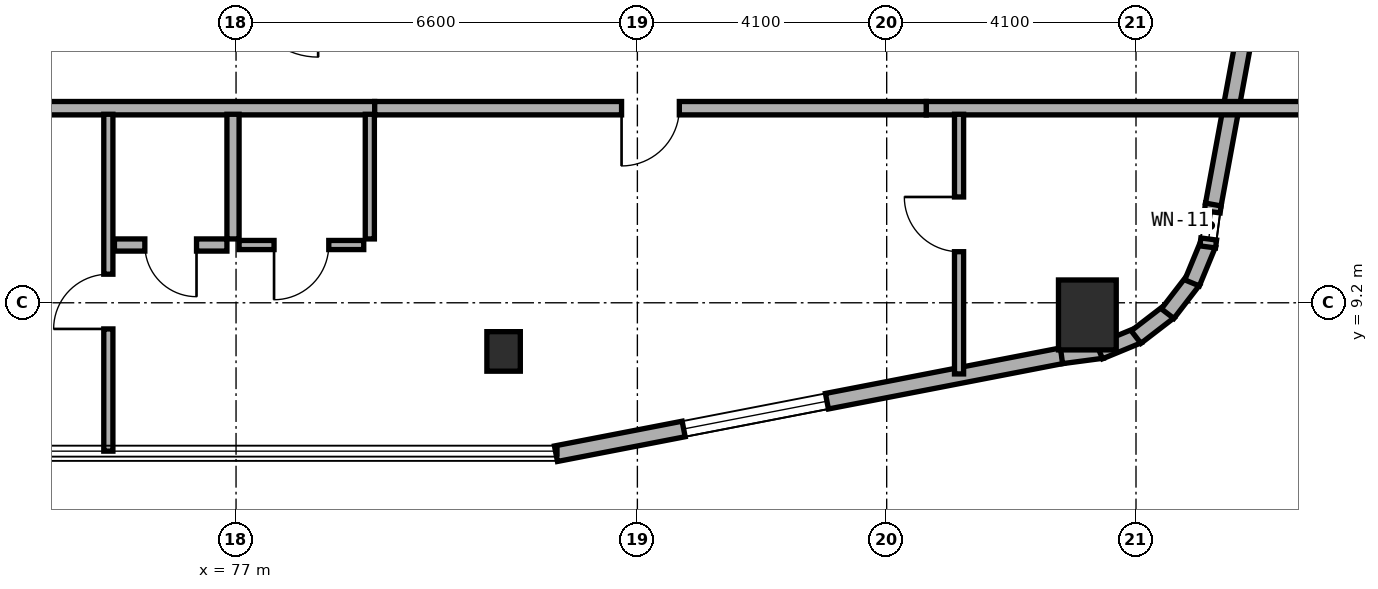
"""IFC4 building model, lengths in metres.
Left out: names, types, materials, properties, quantities, classifications, styles, units other than length and angle.
Written with IfcOpenShell. Run it as: python <this file> out.ifc"""

import sys

from ifc_helpers import new_model, si_unit, direction, frame, frame_2d, origin, origin_2d, place, context, subcontext, project, spatial, rectangle, extrude, element, fill, save


model = new_model("IFC4")
c1 = context("Model", 3, precision=1e-05, world=origin(), true_north=direction((0.0, 1.0)))
c2 = subcontext(c1, "Body", "Model", "MODEL_VIEW")
j1 = project(units=[si_unit("LENGTHUNIT", "METRE"), si_unit("PLANEANGLEUNIT", "RADIAN")], contexts=[c1])
p1 = place(None, origin())
s1 = spatial("IfcSite", under=j1, at=p1, CompositionType="ELEMENT")
p2 = place(p1, origin())
s2 = spatial("IfcBuilding", under=s1, at=p2, CompositionType="ELEMENT")
p3 = place(p2, frame((0.0, 0.0, 116.0)))
s3 = spatial("IfcBuildingStorey", under=s2, at=p3, CompositionType="ELEMENT", Elevation=116.0)
p4 = place(p3, frame((81.4, 8.4, 0.0), z_axis=(0.0, 0.0, 1.0), x_axis=(1.0, 0.0, 0.0)))
e1 = element("IfcColumn", 1, at=p4, inside=s3, PredefinedType="COLUMN", context=c2, shape_type="SweptSolid", body=[
    extrude(rectangle(XDim=0.55, YDim=0.65, at=origin_2d()), origin(), (0.0, 0.0, 1.0), 3.5),
])
p5 = place(p3, frame((91.0, 9.0, 0.0), z_axis=(0.0, 0.0, 1.0), x_axis=(1.0, 0.0, 0.0)))
e2 = element("IfcColumn", 2, at=p5, inside=s3, PredefinedType="COLUMN", context=c2, shape_type="SweptSolid", body=[
    extrude(rectangle(XDim=0.95, YDim=1.15, at=origin_2d()), origin(), (0.0, 0.0, 1.0), 3.5),
])
p6 = place(p3, frame((82.261, 6.718, 0.0), z_axis=(0.0, 0.0, 1.0), x_axis=(0.981750199588, 0.190175039396, 0.0)))
e3 = element("IfcWall", 3, at=p6, inside=s3, PredefinedType="STANDARD", context=c2, shape_type="SweptSolid", body=[
    extrude(rectangle(XDim=8.477, YDim=0.26, at=frame_2d((4.238, 0.0))), origin(), (0.0, 0.0, 1.0), 3.18),
])
p7 = place(p6, frame((2.139, 0.0, 0.8)))
e4 = element("IfcOpeningElement", 4, at=p7, cuts=e3, PredefinedType="OPENING", context=c2, shape_type="SweptSolid", body=[
    extrude(rectangle(XDim=2.4, YDim=1.6, at=frame_2d((1.2, 0.8))), frame((0.0, 0.14, 0.0), z_axis=(0.0, -1.0, 0.0), x_axis=(1.0, 0.0, 0.0)), (0.0, 0.0, 1.0), 0.28),
])
p8 = place(p3, frame((90.575, 8.328, 0.0), z_axis=(0.0, 0.0, 1.0), x_axis=(0.991300187529, 0.13162043232, 0.0)))
e5 = element("IfcWall", 5, at=p8, inside=s3, PredefinedType="STANDARD", context=c2, shape_type="SweptSolid", body=[
    extrude(rectangle(XDim=0.677, YDim=0.26, at=frame_2d((0.338, 0.0))), origin(), (0.0, 0.0, 1.0), 3.18),
])
for number, where, z_axis, x_axis in (
    (6, (91.2, 8.399, 0.0), (0.0, 0.0, 1.0), (0.924, 0.382, 0.0)),
    (7, (91.801, 8.636, 0.0), (0.0, 0.0, 1.0), (0.793, 0.61, 0.0)),
    (8, (92.32, 9.021, 0.0), (0.0, 0.0, 1.0), (0.609, 0.793, 0.0)),
):
    element("IfcWall", number, at=place(p3, frame(where, z_axis=z_axis, x_axis=x_axis)), inside=s3, PredefinedType="STANDARD", context=c2, shape_type="SweptSolid", body=[
        extrude(rectangle(XDim=0.694, YDim=0.26, at=frame_2d((0.347, 0.0))), origin(), (0.0, 0.0, 1.0), 3.18),
    ])
p9 = place(p3, frame((92.722, 9.527, 0.0), z_axis=(0.0, 0.0, 1.0), x_axis=(0.382289608286, 0.924042561464, 0.0)))
e9 = element("IfcWall", 9, at=p9, inside=s3, PredefinedType="STANDARD", context=c2, shape_type="SweptSolid", body=[
    extrude(rectangle(XDim=0.694, YDim=0.26, at=frame_2d((0.347, 0.0))), origin(), (0.0, 0.0, 1.0), 3.18),
])
p10 = place(p3, frame((92.979, 10.119, 0.0), z_axis=(0.0, 0.0, 1.0), x_axis=(0.130614135366, 0.991433279471, 0.0)))
e10 = element("IfcWall", 10, at=p10, inside=s3, PredefinedType="STANDARD", context=c2, shape_type="SweptSolid", body=[
    extrude(rectangle(XDim=0.712, YDim=0.26, at=frame_2d((0.356, 0.0))), origin(), (0.0, 0.0, 1.0), 3.18),
])
p11 = place(p10, frame((0.131, 0.0, 0.85)))
e11 = element("IfcOpeningElement", 11, at=p11, cuts=e10, PredefinedType="OPENING", context=c2, shape_type="SweptSolid", body=[
    extrude(rectangle(XDim=0.45, YDim=1.5, at=frame_2d((0.225, 0.75))), frame((0.0, 0.14, 0.0), z_axis=(0.0, -1.0, 0.0), x_axis=(1.0, 0.0, 0.0)), (0.0, 0.0, 1.0), 0.28),
])
p12 = place(p3, frame((93.071, 10.816, 0.0), z_axis=(0.0, 0.0, 1.0), x_axis=(0.181209963057, 0.983444431215, 0.0)))
e12 = element("IfcWall", 12, at=p12, inside=s3, PredefinedType="STANDARD", context=c2, shape_type="SweptSolid", body=[
    extrude(rectangle(XDim=8.889, YDim=0.26, at=frame_2d((4.445, 0.0))), origin(), (0.0, 0.0, 1.0), 3.18),
])
p13 = place(p12, frame((5.045, 0.0, 0.8)))
e13 = element("IfcOpeningElement", 13, at=p13, cuts=e12, PredefinedType="OPENING", context=c2, shape_type="SweptSolid", body=[
    extrude(rectangle(XDim=2.4, YDim=1.6, at=frame_2d((1.2, 0.8))), frame((0.0, 0.14, 0.0), z_axis=(0.0, -1.0, 0.0), x_axis=(1.0, 0.0, 0.0)), (0.0, 0.0, 1.0), 0.28),
])
p14 = place(p3, frame((72.6, 12.4, 0.0), z_axis=(0.0, 0.0, 1.0), x_axis=(1.0, 0.0, 0.0)))
e14 = element("IfcWall", 14, at=p14, inside=s3, PredefinedType="SOLIDWALL", context=c2, shape_type="SweptSolid", body=[
    extrude(rectangle(XDim=6.68, YDim=0.22, at=frame_2d((3.34, 0.0))), origin(), (0.0, 0.0, 1.0), 2.755),
])
p15 = place(p3, frame((88.35, 12.4, 0.0), z_axis=(0.0, 0.0, 1.0), x_axis=(1.0, 0.0, 0.0)))
e15 = element("IfcWall", 15, at=p15, inside=s3, PredefinedType="SOLIDWALL", context=c2, shape_type="SweptSolid", body=[
    extrude(rectangle(XDim=6.29, YDim=0.22, at=frame_2d((3.145, 0.0))), origin(), (0.0, 0.0, 1.0), 2.875),
])
p16 = place(p3, frame((79.28, 12.4, 0.0), z_axis=(0.0, 0.0, 1.0), x_axis=(1.0, 0.0, 0.0)))
e16 = element("IfcWall", 16, at=p16, inside=s3, PredefinedType="SOLIDWALL", context=c2, shape_type="SweptSolid", body=[
    extrude(rectangle(XDim=9.07, YDim=0.22, at=frame_2d((4.535, 0.0))), origin(), (0.0, 0.0, 1.0), 2.755),
])
p17 = place(p16, frame((4.06, 0.0, 0.0)))
e17 = element("IfcOpeningElement", 17, at=p17, cuts=e16, PredefinedType="OPENING", context=c2, shape_type="SweptSolid", body=[
    extrude(rectangle(XDim=0.95, YDim=2.1, at=frame_2d((0.475, 1.05))), frame((0.0, 0.12, 0.0), z_axis=(0.0, -1.0, 0.0), x_axis=(1.0, 0.0, 0.0)), (0.0, 0.0, 1.0), 0.24),
])
p18 = place(p3, frame((74.9, 6.76, 0.0), z_axis=(0.0, 0.0, 1.0), x_axis=(0.0, 1.0, 0.0)))
e18 = element("IfcWall", 18, at=p18, inside=s3, PredefinedType="PARTITIONING", context=c2, shape_type="SweptSolid", body=[
    extrude(rectangle(XDim=5.54, YDim=0.15, at=frame_2d((2.77, 0.0))), origin(), (0.0, 0.0, 1.0), 2.855),
])
p19 = place(p18, frame((2.01, 0.0, 0.0)))
e19 = element("IfcOpeningElement", 19, at=p19, cuts=e18, PredefinedType="OPENING", context=c2, shape_type="SweptSolid", body=[
    extrude(rectangle(XDim=0.9, YDim=2.1, at=frame_2d((0.45, 1.05))), frame((0.0, 0.085, 0.0), z_axis=(0.0, -1.0, 0.0), x_axis=(1.0, 0.0, 0.0)), (0.0, 0.0, 1.0), 0.17),
])
p20 = place(p3, frame((88.89, 8.03, 0.0), z_axis=(0.0, 0.0, 1.0), x_axis=(0.0, 1.0, 0.0)))
e20 = element("IfcWall", 20, at=p20, inside=s3, PredefinedType="PARTITIONING", context=c2, shape_type="SweptSolid", body=[
    extrude(rectangle(XDim=4.27, YDim=0.15, at=frame_2d((2.135, 0.0))), origin(), (0.0, 0.0, 1.0), 2.875),
])
p21 = place(p20, frame((2.01, 0.0, 0.0)))
e21 = element("IfcOpeningElement", 21, at=p21, cuts=e20, PredefinedType="OPENING", context=c2, shape_type="SweptSolid", body=[
    extrude(rectangle(XDim=0.9, YDim=2.1, at=frame_2d((0.45, 1.05))), frame((0.0, 0.085, 0.0), z_axis=(0.0, -1.0, 0.0), x_axis=(1.0, 0.0, 0.0)), (0.0, 0.0, 1.0), 0.17),
])
p22 = place(p3, frame((76.95, 10.25, 0.0), z_axis=(0.0, 0.0, 1.0), x_axis=(0.0, 1.0, 0.0)))
e22 = element("IfcWall", 22, at=p22, inside=s3, PredefinedType="PLUMBINGWALL", context=c2, shape_type="SweptSolid", body=[
    extrude(rectangle(XDim=2.05, YDim=0.2, at=frame_2d((1.025, 0.0))), origin(), (0.0, 0.0, 1.0), 2.855),
])
p23 = place(p3, frame((79.2, 10.25, 0.0), z_axis=(0.0, 0.0, 1.0), x_axis=(0.0, 1.0, 0.0)))
e23 = element("IfcWall", 23, at=p23, inside=s3, PredefinedType="PARTITIONING", context=c2, shape_type="SweptSolid", body=[
    extrude(rectangle(XDim=2.05, YDim=0.15, at=frame_2d((1.025, 0.0))), origin(), (0.0, 0.0, 1.0), 2.855),
])
p24 = place(p3, frame((75.0, 10.15, 0.0), z_axis=(0.0, 0.0, 1.0), x_axis=(1.0, 0.0, 0.0)))
e24 = element("IfcWall", 24, at=p24, inside=s3, PredefinedType="PLUMBINGWALL", context=c2, shape_type="SweptSolid", body=[
    extrude(rectangle(XDim=1.85, YDim=0.2, at=frame_2d((0.925, 0.0))), origin(), (0.0, 0.0, 1.0), 3.18),
])
p25 = place(p24, frame((0.5, 0.0, 0.0)))
e25 = element("IfcOpeningElement", 25, at=p25, cuts=e24, PredefinedType="OPENING", context=c2, shape_type="SweptSolid", body=[
    extrude(rectangle(XDim=0.85, YDim=2.1, at=frame_2d((0.425, 1.05))), frame((0.0, 0.11, 0.0), z_axis=(0.0, -1.0, 0.0), x_axis=(1.0, 0.0, 0.0)), (0.0, 0.0, 1.0), 0.22),
])
p26 = place(p3, frame((77.05, 10.15, 0.0), z_axis=(0.0, 0.0, 1.0), x_axis=(1.0, 0.0, 0.0)))
e26 = element("IfcWall", 26, at=p26, inside=s3, PredefinedType="PARTITIONING", context=c2, shape_type="SweptSolid", body=[
    extrude(rectangle(XDim=2.05, YDim=0.15, at=frame_2d((1.025, 0.0))), origin(), (0.0, 0.0, 1.0), 3.18),
])
p27 = place(p26, frame((0.575, 0.0, 0.0)))
e27 = element("IfcOpeningElement", 27, at=p27, cuts=e26, PredefinedType="OPENING", context=c2, shape_type="SweptSolid", body=[
    extrude(rectangle(XDim=0.9, YDim=2.1, at=frame_2d((0.45, 1.05))), frame((0.0, 0.085, 0.0), z_axis=(0.0, -1.0, 0.0), x_axis=(1.0, 0.0, 0.0)), (0.0, 0.0, 1.0), 0.17),
])
p28 = place(p7, origin())
e28 = element("IfcWindow", 28, at=p28, inside=s3, PartitioningType="SINGLE_PANEL", PredefinedType="WINDOW", context=c2, shape_type="SweptSolid", body=[
    extrude(rectangle(XDim=2.4, YDim=1.6, at=frame_2d((1.2, 0.8))), frame((0.0, 0.03, 0.0), z_axis=(0.0, -1.0, 0.0), x_axis=(1.0, 0.0, 0.0)), (0.0, 0.0, 1.0), 0.06),
])
fill(e4, e28)
p29 = place(p11, origin())
e29 = element("IfcWindow", 29, at=p29, inside=s3, PartitioningType="SINGLE_PANEL", PredefinedType="WINDOW", context=c2, shape_type="SweptSolid", body=[
    extrude(rectangle(XDim=0.45, YDim=1.5, at=frame_2d((0.225, 0.75))), frame((0.0, 0.03, 0.0), z_axis=(0.0, -1.0, 0.0), x_axis=(1.0, 0.0, 0.0)), (0.0, 0.0, 1.0), 0.06),
])
fill(e11, e29)
p30 = place(p17, frame((0.95, 0.0, 0.0), z_axis=(0.0, 0.0, 1.0), x_axis=(-1.0, 0.0, 0.0)))
e30 = element("IfcDoor", 30, at=p30, inside=s3, OperationType="SINGLE_SWING_RIGHT", PredefinedType="DOOR", context=c2, shape_type="SweptSolid", body=[
    extrude(rectangle(XDim=0.95, YDim=2.1, at=frame_2d((0.475, 1.05))), frame((0.0, 0.025, 0.0), z_axis=(0.0, -1.0, 0.0), x_axis=(1.0, 0.0, 0.0)), (0.0, 0.0, 1.0), 0.05),
])
fill(e17, e30)
p31 = place(p19, origin())
e31 = element("IfcDoor", 31, at=p31, inside=s3, OperationType="SINGLE_SWING_LEFT", PredefinedType="DOOR", context=c2, shape_type="SweptSolid", body=[
    extrude(rectangle(XDim=0.9, YDim=2.1, at=frame_2d((0.45, 1.05))), frame((0.0, 0.025, 0.0), z_axis=(0.0, -1.0, 0.0), x_axis=(1.0, 0.0, 0.0)), (0.0, 0.0, 1.0), 0.05),
])
fill(e19, e31)
p32 = place(p21, origin())
e32 = element("IfcDoor", 32, at=p32, inside=s3, OperationType="SINGLE_SWING_RIGHT", PredefinedType="DOOR", context=c2, shape_type="SweptSolid", body=[
    extrude(rectangle(XDim=0.9, YDim=2.1, at=frame_2d((0.45, 1.05))), frame((0.0, 0.025, 0.0), z_axis=(0.0, -1.0, 0.0), x_axis=(1.0, 0.0, 0.0)), (0.0, 0.0, 1.0), 0.05),
])
fill(e21, e32)
p33 = place(p25, frame((0.85, 0.0, 0.0), z_axis=(0.0, 0.0, 1.0), x_axis=(-1.0, 0.0, 0.0)))
e33 = element("IfcDoor", 33, at=p33, inside=s3, OperationType="SINGLE_SWING_LEFT", PredefinedType="DOOR", context=c2, shape_type="SweptSolid", body=[
    extrude(rectangle(XDim=0.85, YDim=2.1, at=frame_2d((0.425, 1.05))), frame((0.0, 0.025, 0.0), z_axis=(0.0, -1.0, 0.0), x_axis=(1.0, 0.0, 0.0)), (0.0, 0.0, 1.0), 0.05),
])
fill(e25, e33)
p34 = place(p27, frame((0.9, 0.0, 0.0), z_axis=(0.0, 0.0, 1.0), x_axis=(-1.0, 0.0, 0.0)))
e34 = element("IfcDoor", 34, at=p34, inside=s3, OperationType="SINGLE_SWING_RIGHT", PredefinedType="DOOR", context=c2, shape_type="SweptSolid", body=[
    extrude(rectangle(XDim=0.9, YDim=2.1, at=frame_2d((0.45, 1.05))), frame((0.0, 0.025, 0.0), z_axis=(0.0, -1.0, 0.0), x_axis=(1.0, 0.0, 0.0)), (0.0, 0.0, 1.0), 0.05),
])
fill(e27, e34)
save(model, sys.argv[1])
